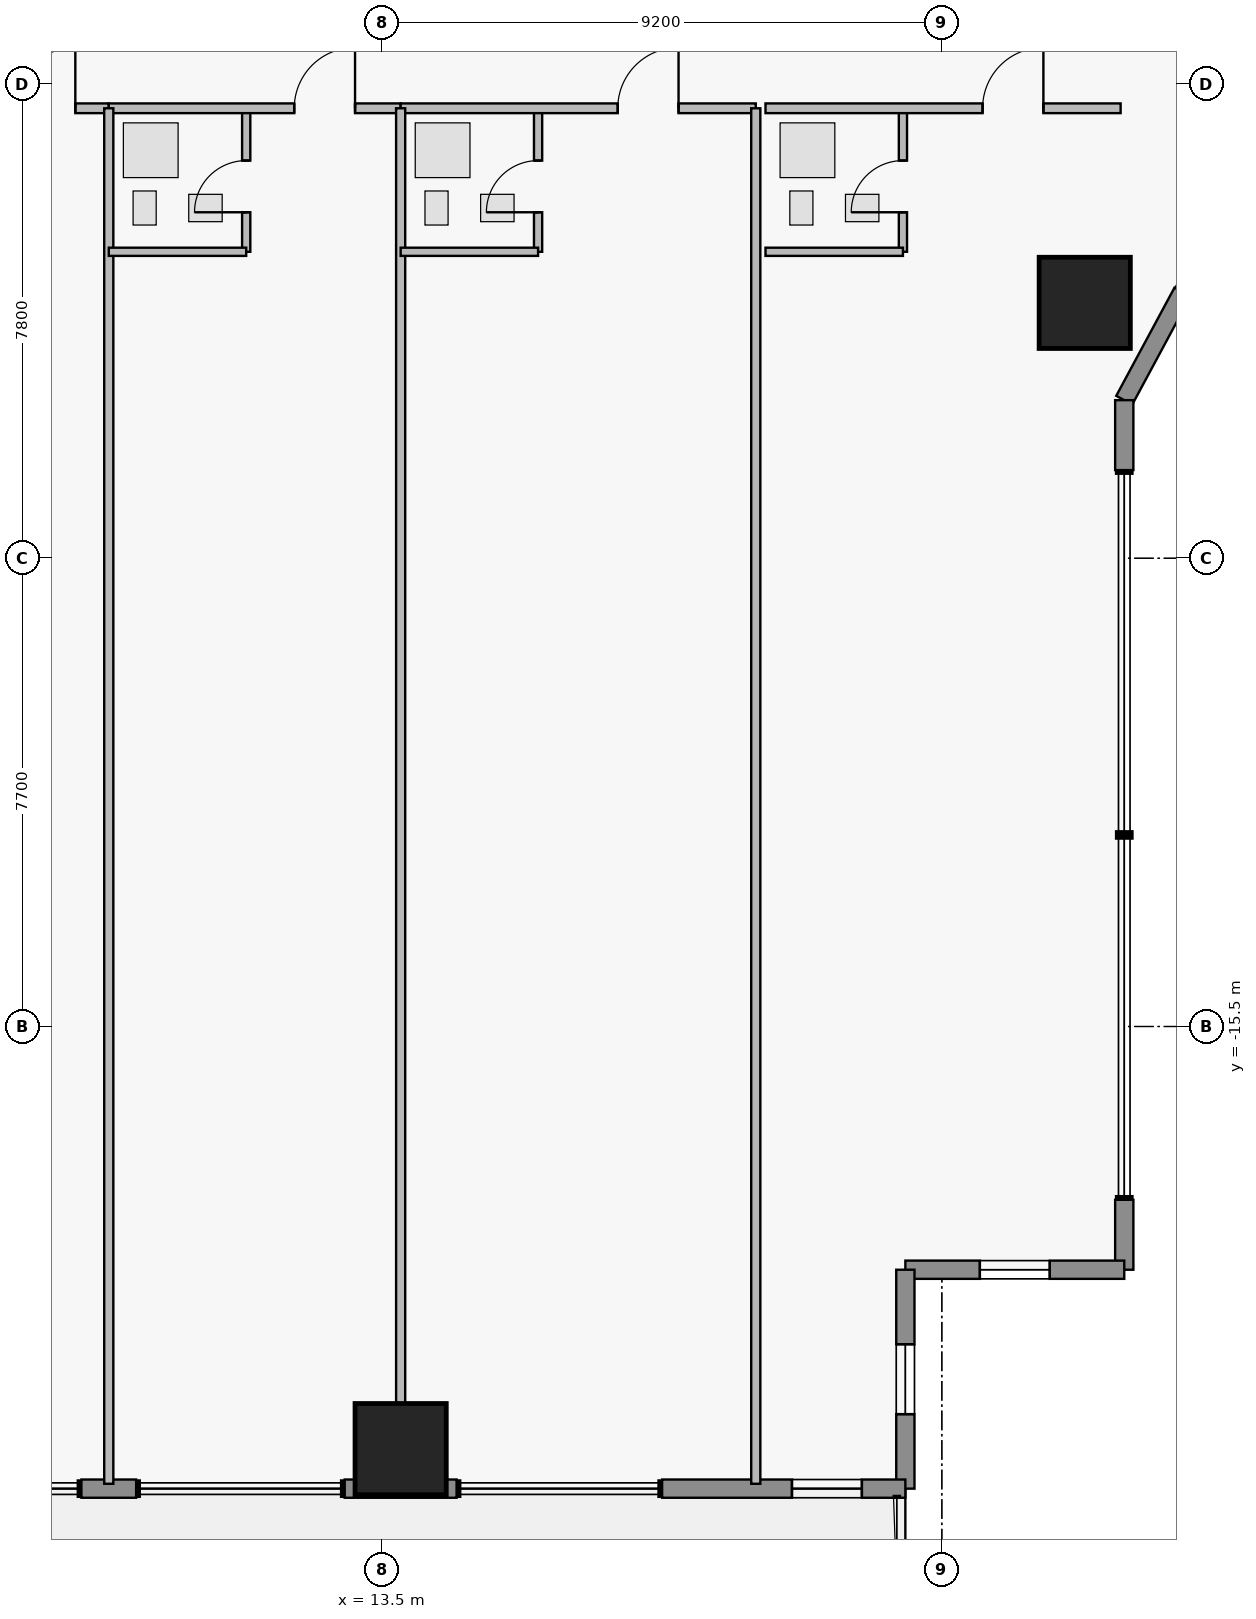
"""IFC4 building model, lengths in metres.
Left out: names, types, materials, properties, quantities, classifications, styles, units other than length and angle.
Written with IfcOpenShell. Run it as: python <this file> out.ifc"""

import sys

from ifc_helpers import new_model, si_unit, direction, frame, frame_2d, origin, origin_2d, place, context, subcontext, project, spatial, rectangle, extrude, element, fill, save


model = new_model("IFC4")
c1 = context("Model", 3, precision=1e-05, world=origin(), true_north=direction((0.0, 1.0)))
c2 = subcontext(c1, "Body", "Model", "MODEL_VIEW")
j1 = project(units=[si_unit("LENGTHUNIT", "METRE"), si_unit("PLANEANGLEUNIT", "RADIAN")], contexts=[c1])
p1 = place(None, origin())
s1 = spatial("IfcSite", under=j1, at=p1, CompositionType="ELEMENT")
p2 = place(p1, origin())
s2 = spatial("IfcBuilding", under=s1, at=p2, CompositionType="ELEMENT")
p3 = place(p2, frame((0.0, 0.0, 60.45)))
s3 = spatial("IfcBuildingStorey", under=s2, at=p3, CompositionType="ELEMENT", Elevation=60.45)
for number, where, z_axis, x_axis in (
    (1, (13.8, -22.45, 0.0), (0.0, 0.0, 1.0), (1.0, 0.0, 0.0)),
    (2, (25.05, -3.6, 0.0), (0.0, 0.0, 1.0), (1.0, 0.0, 0.0)),
):
    element("IfcColumn", number, at=place(p3, frame(where, z_axis=z_axis, x_axis=x_axis)), inside=s3, PredefinedType="COLUMN", context=c2, shape_type="SweptSolid", body=[
        extrude(rectangle(XDim=1.5, YDim=1.5, at=origin_2d()), origin(), (0.0, 0.0, 1.0), 3.65),
    ])
p4 = place(p3, frame((25.7, 5.2, 0.0), z_axis=(0.0, 0.0, 1.0), x_axis=(0.474109683532, -0.880465790352, 0.0)))
e3 = element("IfcWall", 3, at=p4, inside=s3, PredefinedType="STANDARD", context=c2, shape_type="SweptSolid", body=[
    extrude(rectangle(XDim=5.906, YDim=0.3, at=frame_2d((2.953, 0.0))), origin(), (0.0, 0.0, 1.0), 3.43),
])
p5 = place(p4, frame((2.324, 0.0, 0.95)))
e4 = element("IfcOpeningElement", 4, at=p5, cuts=e3, PredefinedType="OPENING", context=c2, shape_type="SweptSolid", body=[
    extrude(rectangle(XDim=1.15, YDim=1.55, at=frame_2d((0.575, 0.775))), frame((0.0, 0.16, 0.0), z_axis=(0.0, -1.0, 0.0), x_axis=(1.0, 0.0, 0.0)), (0.0, 0.0, 1.0), 0.32),
])
p6 = place(p3, frame((26.658, -3.421, 0.0), z_axis=(0.0, 0.0, 1.0), x_axis=(-0.474121438562, -0.88045946045, 0.0)))
e5 = element("IfcWall", 5, at=p6, inside=s3, PredefinedType="STANDARD", context=c2, shape_type="SweptSolid", body=[
    extrude(rectangle(XDim=2.021, YDim=0.3, at=frame_2d((1.01, 0.0))), origin(), (0.0, 0.0, 1.0), 3.43),
])
p7 = place(p3, frame((25.7, -5.2, 0.0), z_axis=(0.0, 0.0, 1.0), x_axis=(0.0, -1.0, 0.0)))
e6 = element("IfcWall", 6, at=p7, inside=s3, PredefinedType="STANDARD", context=c2, shape_type="SweptSolid", body=[
    extrude(rectangle(XDim=1.15, YDim=0.3, at=frame_2d((0.575, 0.0))), origin(), (0.0, 0.0, 1.0), 3.43),
])
p8 = place(p3, frame((25.7, -18.35, 0.0), z_axis=(0.0, 0.0, 1.0), x_axis=(0.0, -1.0, 0.0)))
e7 = element("IfcWall", 7, at=p8, inside=s3, PredefinedType="STANDARD", context=c2, shape_type="SweptSolid", body=[
    extrude(rectangle(XDim=1.15, YDim=0.3, at=frame_2d((0.575, 0.0))), origin(), (0.0, 0.0, 1.0), 3.43),
])
p9 = place(p3, frame((25.7, -19.5, 0.0), z_axis=(0.0, 0.0, 1.0), x_axis=(-1.0, 0.0, 0.0)))
e8 = element("IfcWall", 8, at=p9, inside=s3, PredefinedType="STANDARD", context=c2, shape_type="SweptSolid", body=[
    extrude(rectangle(XDim=3.6, YDim=0.3, at=frame_2d((1.8, 0.0))), origin(), (0.0, 0.0, 1.0), 3.43),
])
p10 = place(p9, frame((1.225, 0.0, 1.25)))
e9 = element("IfcOpeningElement", 9, at=p10, cuts=e8, PredefinedType="OPENING", context=c2, shape_type="SweptSolid", body=[
    extrude(rectangle(XDim=1.15, YDim=1.55, at=frame_2d((0.575, 0.775))), frame((0.0, 0.16, 0.0), z_axis=(0.0, -1.0, 0.0), x_axis=(1.0, 0.0, 0.0)), (0.0, 0.0, 1.0), 0.32),
])
p11 = place(p3, frame((22.1, -19.5, 0.0), z_axis=(0.0, 0.0, 1.0), x_axis=(0.0, -1.0, 0.0)))
e10 = element("IfcWall", 10, at=p11, inside=s3, PredefinedType="STANDARD", context=c2, shape_type="SweptSolid", body=[
    extrude(rectangle(XDim=3.6, YDim=0.3, at=frame_2d((1.8, 0.0))), origin(), (0.0, 0.0, 1.0), 3.43),
])
p12 = place(p11, frame((1.225, 0.0, 1.25)))
e11 = element("IfcOpeningElement", 11, at=p12, cuts=e10, PredefinedType="OPENING", context=c2, shape_type="SweptSolid", body=[
    extrude(rectangle(XDim=1.15, YDim=1.55, at=frame_2d((0.575, 0.775))), frame((0.0, 0.16, 0.0), z_axis=(0.0, -1.0, 0.0), x_axis=(1.0, 0.0, 0.0)), (0.0, 0.0, 1.0), 0.32),
])
p13 = place(p3, frame((22.1, -23.1, 0.0), z_axis=(0.0, 0.0, 1.0), x_axis=(-1.0, 0.0, 0.0)))
e12 = element("IfcWall", 12, at=p13, inside=s3, PredefinedType="STANDARD", context=c2, shape_type="SweptSolid", body=[
    extrude(rectangle(XDim=4.0, YDim=0.3, at=frame_2d((2.0, 0.0))), origin(), (0.0, 0.0, 1.0), 3.43),
])
p14 = place(p13, frame((0.715, 0.0, 0.95)))
e13 = element("IfcOpeningElement", 13, at=p14, cuts=e12, PredefinedType="OPENING", context=c2, shape_type="SweptSolid", body=[
    extrude(rectangle(XDim=1.15, YDim=1.55, at=frame_2d((0.575, 0.775))), frame((0.0, 0.16, 0.0), z_axis=(0.0, -1.0, 0.0), x_axis=(1.0, 0.0, 0.0)), (0.0, 0.0, 1.0), 0.32),
])
p15 = place(p3, frame((14.72, -23.1, 0.0), z_axis=(0.0, 0.0, 1.0), x_axis=(-1.0, 0.0, 0.0)))
e14 = element("IfcWall", 14, at=p15, inside=s3, PredefinedType="STANDARD", context=c2, shape_type="SweptSolid", body=[
    extrude(rectangle(XDim=1.84, YDim=0.3, at=frame_2d((0.92, 0.0))), origin(), (0.0, 0.0, 1.0), 3.43),
])
p16 = place(p3, frame((9.45, -23.1, 0.0), z_axis=(0.0, 0.0, 1.0), x_axis=(-1.0, 0.0, 0.0)))
e15 = element("IfcWall", 15, at=p16, inside=s3, PredefinedType="STANDARD", context=c2, shape_type="SweptSolid", body=[
    extrude(rectangle(XDim=0.9, YDim=0.3, at=frame_2d((0.45, 0.0))), origin(), (0.0, 0.0, 1.0), 3.43),
])
p17 = place(p3, frame((4.6, -0.4, 0.0), z_axis=(0.0, 0.0, 1.0), x_axis=(1.0, 0.0, 0.0)))
e16 = element("IfcWall", 16, at=p17, inside=s3, PredefinedType="PARTITIONING", context=c2, shape_type="SweptSolid", body=[
    extrude(rectangle(XDim=4.4, YDim=0.16, at=frame_2d((2.2, 0.0))), origin(), (0.0, 0.0, 1.0), 3.43),
])
p18 = place(p17, frame((2.85, 0.0, 0.0)))
e17 = element("IfcOpeningElement", 17, at=p18, cuts=e16, PredefinedType="OPENING", context=c2, shape_type="SweptSolid", body=[
    extrude(rectangle(XDim=1.0, YDim=2.15, at=frame_2d((0.5, 1.075))), frame((0.0, 0.09, 0.0), z_axis=(0.0, -1.0, 0.0), x_axis=(1.0, 0.0, 0.0)), (0.0, 0.0, 1.0), 0.18),
])
p19 = place(p3, frame((11.26, -2.76, 0.0), z_axis=(0.0, 0.0, 1.0), x_axis=(0.0, 1.0, 0.0)))
e18 = element("IfcWall", 18, at=p19, inside=s3, PredefinedType="PLUMBINGWALL", context=c2, shape_type="SweptSolid", body=[
    extrude(rectangle(XDim=2.36, YDim=0.135, at=frame_2d((1.18, 0.0))), origin(), (0.0, 0.0, 1.0), 3.43),
])
p20 = place(p19, frame((0.65, 0.0, 0.0)))
e19 = element("IfcOpeningElement", 19, at=p20, cuts=e18, PredefinedType="OPENING", context=c2, shape_type="SweptSolid", body=[
    extrude(rectangle(XDim=0.85, YDim=2.1, at=frame_2d((0.425, 1.05))), frame((0.0, 0.077, 0.0), z_axis=(0.0, -1.0, 0.0), x_axis=(1.0, 0.0, 0.0)), (0.0, 0.0, 1.0), 0.155),
])
p21 = place(p3, frame((9.0, -0.4, 0.0), z_axis=(0.0, 0.0, 1.0), x_axis=(1.0, 0.0, 0.0)))
e20 = element("IfcWall", 20, at=p21, inside=s3, PredefinedType="PARTITIONING", context=c2, shape_type="SweptSolid", body=[
    extrude(rectangle(XDim=4.8, YDim=0.16, at=frame_2d((2.4, 0.0))), origin(), (0.0, 0.0, 1.0), 3.43),
])
p22 = place(p21, frame((3.05, 0.0, 0.0)))
e21 = element("IfcOpeningElement", 21, at=p22, cuts=e20, PredefinedType="OPENING", context=c2, shape_type="SweptSolid", body=[
    extrude(rectangle(XDim=1.0, YDim=2.15, at=frame_2d((0.5, 1.075))), frame((0.0, 0.09, 0.0), z_axis=(0.0, -1.0, 0.0), x_axis=(1.0, 0.0, 0.0)), (0.0, 0.0, 1.0), 0.18),
])
p23 = place(p3, frame((16.06, -2.76, 0.0), z_axis=(0.0, 0.0, 1.0), x_axis=(0.0, 1.0, 0.0)))
e22 = element("IfcWall", 22, at=p23, inside=s3, PredefinedType="PLUMBINGWALL", context=c2, shape_type="SweptSolid", body=[
    extrude(rectangle(XDim=2.36, YDim=0.135, at=frame_2d((1.18, 0.0))), origin(), (0.0, 0.0, 1.0), 3.43),
])
p24 = place(p23, frame((0.65, 0.0, 0.0)))
e23 = element("IfcOpeningElement", 23, at=p24, cuts=e22, PredefinedType="OPENING", context=c2, shape_type="SweptSolid", body=[
    extrude(rectangle(XDim=0.85, YDim=2.1, at=frame_2d((0.425, 1.05))), frame((0.0, 0.077, 0.0), z_axis=(0.0, -1.0, 0.0), x_axis=(1.0, 0.0, 0.0)), (0.0, 0.0, 1.0), 0.155),
])
p25 = place(p3, frame((13.8, -0.4, 0.0), z_axis=(0.0, 0.0, 1.0), x_axis=(1.0, 0.0, 0.0)))
e24 = element("IfcWall", 24, at=p25, inside=s3, PredefinedType="PARTITIONING", context=c2, shape_type="SweptSolid", body=[
    extrude(rectangle(XDim=5.84, YDim=0.16, at=frame_2d((2.92, 0.0))), origin(), (0.0, 0.0, 1.0), 3.43),
])
p26 = place(p25, frame((3.57, 0.0, 0.0)))
e25 = element("IfcOpeningElement", 25, at=p26, cuts=e24, PredefinedType="OPENING", context=c2, shape_type="SweptSolid", body=[
    extrude(rectangle(XDim=1.0, YDim=2.15, at=frame_2d((0.5, 1.075))), frame((0.0, 0.09, 0.0), z_axis=(0.0, -1.0, 0.0), x_axis=(1.0, 0.0, 0.0)), (0.0, 0.0, 1.0), 0.18),
])
p27 = place(p3, frame((22.06, -2.76, 0.0), z_axis=(0.0, 0.0, 1.0), x_axis=(0.0, 1.0, 0.0)))
e26 = element("IfcWall", 26, at=p27, inside=s3, PredefinedType="PLUMBINGWALL", context=c2, shape_type="SweptSolid", body=[
    extrude(rectangle(XDim=2.36, YDim=0.135, at=frame_2d((1.18, 0.0))), origin(), (0.0, 0.0, 1.0), 3.43),
])
p28 = place(p27, frame((0.65, 0.0, 0.0)))
e27 = element("IfcOpeningElement", 27, at=p28, cuts=e26, PredefinedType="OPENING", context=c2, shape_type="SweptSolid", body=[
    extrude(rectangle(XDim=0.85, YDim=2.1, at=frame_2d((0.425, 1.05))), frame((0.0, 0.077, 0.0), z_axis=(0.0, -1.0, 0.0), x_axis=(1.0, 0.0, 0.0)), (0.0, 0.0, 1.0), 0.155),
])
p29 = place(p3, frame((19.8, -0.4, 0.0), z_axis=(0.0, 0.0, 1.0), x_axis=(1.0, 0.0, 0.0)))
e28 = element("IfcWall", 28, at=p29, inside=s3, PredefinedType="PARTITIONING", context=c2, shape_type="SweptSolid", body=[
    extrude(rectangle(XDim=5.84, YDim=0.16, at=frame_2d((2.92, 0.0))), origin(), (0.0, 0.0, 1.0), 3.43),
])
p30 = place(p29, frame((3.57, 0.0, 0.0)))
e29 = element("IfcOpeningElement", 29, at=p30, cuts=e28, PredefinedType="OPENING", context=c2, shape_type="SweptSolid", body=[
    extrude(rectangle(XDim=1.0, YDim=2.15, at=frame_2d((0.5, 1.075))), frame((0.0, 0.09, 0.0), z_axis=(0.0, -1.0, 0.0), x_axis=(1.0, 0.0, 0.0)), (0.0, 0.0, 1.0), 0.18),
])
p31 = place(p3, frame((9.0, -23.02, 0.0), z_axis=(0.0, 0.0, 1.0), x_axis=(0.0, 1.0, 0.0)))
e30 = element("IfcWall", 30, at=p31, inside=s3, PredefinedType="PARTITIONING", context=c2, shape_type="SweptSolid", body=[
    extrude(rectangle(XDim=22.62, YDim=0.15, at=frame_2d((11.31, 0.0))), origin(), (0.0, 0.0, 1.0), 3.43),
])
p32 = place(p3, frame((9.0, -2.76, 0.0), z_axis=(0.0, 0.0, 1.0), x_axis=(1.0, 0.0, 0.0)))
e31 = element("IfcWall", 31, at=p32, inside=s3, PredefinedType="PLUMBINGWALL", context=c2, shape_type="SweptSolid", body=[
    extrude(rectangle(XDim=2.26, YDim=0.135, at=frame_2d((1.13, 0.0))), origin(), (0.0, 0.0, 1.0), 3.43),
])
p33 = place(p3, frame((13.8, -23.02, 0.0), z_axis=(0.0, 0.0, 1.0), x_axis=(0.0, 1.0, 0.0)))
e32 = element("IfcWall", 32, at=p33, inside=s3, PredefinedType="PARTITIONING", context=c2, shape_type="SweptSolid", body=[
    extrude(rectangle(XDim=22.62, YDim=0.15, at=frame_2d((11.31, 0.0))), origin(), (0.0, 0.0, 1.0), 2.668),
])
p34 = place(p3, frame((13.8, -2.76, 0.0), z_axis=(0.0, 0.0, 1.0), x_axis=(1.0, 0.0, 0.0)))
e33 = element("IfcWall", 33, at=p34, inside=s3, PredefinedType="PLUMBINGWALL", context=c2, shape_type="SweptSolid", body=[
    extrude(rectangle(XDim=2.26, YDim=0.135, at=frame_2d((1.13, 0.0))), origin(), (0.0, 0.0, 1.0), 3.43),
])
p35 = place(p3, frame((19.64, -23.02, 0.0), z_axis=(0.0, 0.0, 1.0), x_axis=(0.0, 1.0, 0.0)))
e34 = element("IfcWall", 34, at=p35, inside=s3, PredefinedType="PARTITIONING", context=c2, shape_type="SweptSolid", body=[
    extrude(rectangle(XDim=22.62, YDim=0.15, at=frame_2d((11.31, 0.0))), origin(), (0.0, 0.0, 1.0), 3.43),
])
p36 = place(p3, frame((19.8, -2.76, 0.0), z_axis=(0.0, 0.0, 1.0), x_axis=(1.0, 0.0, 0.0)))
e35 = element("IfcWall", 35, at=p36, inside=s3, PredefinedType="PLUMBINGWALL", context=c2, shape_type="SweptSolid", body=[
    extrude(rectangle(XDim=2.26, YDim=0.135, at=frame_2d((1.13, 0.0))), origin(), (0.0, 0.0, 1.0), 3.43),
])
p37 = place(p10, origin())
e36 = element("IfcWindow", 36, at=p37, inside=s3, PartitioningType="SINGLE_PANEL", PredefinedType="WINDOW", context=c2, shape_type="SweptSolid", body=[
    extrude(rectangle(XDim=1.15, YDim=1.55, at=frame_2d((0.575, 0.775))), frame((0.0, 0.03, 0.0), z_axis=(0.0, -1.0, 0.0), x_axis=(1.0, 0.0, 0.0)), (0.0, 0.0, 1.0), 0.06),
])
fill(e9, e36)
p38 = place(p12, origin())
e37 = element("IfcWindow", 37, at=p38, inside=s3, PartitioningType="SINGLE_PANEL", PredefinedType="WINDOW", context=c2, shape_type="SweptSolid", body=[
    extrude(rectangle(XDim=1.15, YDim=1.55, at=frame_2d((0.575, 0.775))), frame((0.0, 0.03, 0.0), z_axis=(0.0, -1.0, 0.0), x_axis=(1.0, 0.0, 0.0)), (0.0, 0.0, 1.0), 0.06),
])
fill(e11, e37)
p39 = place(p14, origin())
e38 = element("IfcWindow", 38, at=p39, inside=s3, PartitioningType="SINGLE_PANEL", PredefinedType="WINDOW", context=c2, shape_type="SweptSolid", body=[
    extrude(rectangle(XDim=1.15, YDim=1.55, at=frame_2d((0.575, 0.775))), frame((0.0, 0.03, 0.0), z_axis=(0.0, -1.0, 0.0), x_axis=(1.0, 0.0, 0.0)), (0.0, 0.0, 1.0), 0.06),
])
fill(e13, e38)
p40 = place(p18, origin())
e39 = element("IfcDoor", 39, at=p40, inside=s3, OperationType="SINGLE_SWING_RIGHT", PredefinedType="DOOR", context=c2, shape_type="SweptSolid", body=[
    extrude(rectangle(XDim=1.0, YDim=2.15, at=frame_2d((0.5, 1.075))), frame((0.0, 0.025, 0.0), z_axis=(0.0, -1.0, 0.0), x_axis=(1.0, 0.0, 0.0)), (0.0, 0.0, 1.0), 0.05),
])
fill(e17, e39)
p41 = place(p20, origin())
e40 = element("IfcDoor", 40, at=p41, inside=s3, OperationType="SINGLE_SWING_LEFT", PredefinedType="DOOR", context=c2, shape_type="SweptSolid", body=[
    extrude(rectangle(XDim=0.85, YDim=2.1, at=frame_2d((0.425, 1.05))), frame((0.0, 0.025, 0.0), z_axis=(0.0, -1.0, 0.0), x_axis=(1.0, 0.0, 0.0)), (0.0, 0.0, 1.0), 0.05),
])
fill(e19, e40)
p42 = place(p22, origin())
e41 = element("IfcDoor", 41, at=p42, inside=s3, OperationType="SINGLE_SWING_RIGHT", PredefinedType="DOOR", context=c2, shape_type="SweptSolid", body=[
    extrude(rectangle(XDim=1.0, YDim=2.15, at=frame_2d((0.5, 1.075))), frame((0.0, 0.025, 0.0), z_axis=(0.0, -1.0, 0.0), x_axis=(1.0, 0.0, 0.0)), (0.0, 0.0, 1.0), 0.05),
])
fill(e21, e41)
p43 = place(p24, origin())
e42 = element("IfcDoor", 42, at=p43, inside=s3, OperationType="SINGLE_SWING_LEFT", PredefinedType="DOOR", context=c2, shape_type="SweptSolid", body=[
    extrude(rectangle(XDim=0.85, YDim=2.1, at=frame_2d((0.425, 1.05))), frame((0.0, 0.025, 0.0), z_axis=(0.0, -1.0, 0.0), x_axis=(1.0, 0.0, 0.0)), (0.0, 0.0, 1.0), 0.05),
])
fill(e23, e42)
p44 = place(p26, origin())
e43 = element("IfcDoor", 43, at=p44, inside=s3, OperationType="SINGLE_SWING_RIGHT", PredefinedType="DOOR", context=c2, shape_type="SweptSolid", body=[
    extrude(rectangle(XDim=1.0, YDim=2.15, at=frame_2d((0.5, 1.075))), frame((0.0, 0.025, 0.0), z_axis=(0.0, -1.0, 0.0), x_axis=(1.0, 0.0, 0.0)), (0.0, 0.0, 1.0), 0.05),
])
fill(e25, e43)
p45 = place(p28, origin())
e44 = element("IfcDoor", 44, at=p45, inside=s3, OperationType="SINGLE_SWING_LEFT", PredefinedType="DOOR", context=c2, shape_type="SweptSolid", body=[
    extrude(rectangle(XDim=0.85, YDim=2.1, at=frame_2d((0.425, 1.05))), frame((0.0, 0.025, 0.0), z_axis=(0.0, -1.0, 0.0), x_axis=(1.0, 0.0, 0.0)), (0.0, 0.0, 1.0), 0.05),
])
fill(e27, e44)
p46 = place(p30, origin())
e45 = element("IfcDoor", 45, at=p46, inside=s3, OperationType="SINGLE_SWING_RIGHT", PredefinedType="DOOR", context=c2, shape_type="SweptSolid", body=[
    extrude(rectangle(XDim=1.0, YDim=2.15, at=frame_2d((0.5, 1.075))), frame((0.0, 0.025, 0.0), z_axis=(0.0, -1.0, 0.0), x_axis=(1.0, 0.0, 0.0)), (0.0, 0.0, 1.0), 0.05),
])
fill(e29, e45)
save(model, sys.argv[1])
